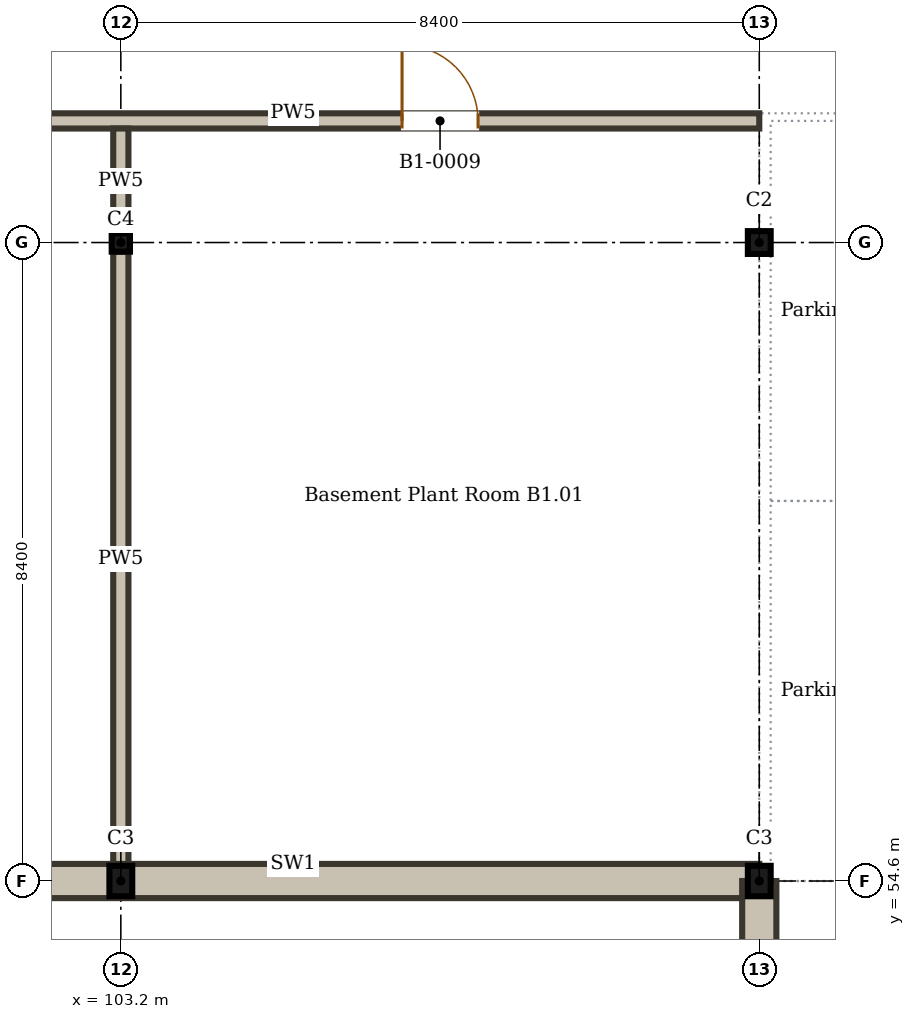
"""IFC4 building model, lengths in metres.
Left out: names, types, materials, properties, quantities, classifications, styles, units other than length and angle.
Written with IfcOpenShell. Run it as: python <this file> out.ifc"""

import sys

from ifc_helpers import new_model, si_unit, direction, frame, frame_2d, origin, origin_2d, place, context, subcontext, project, spatial, rectangle, i_section, extrude, element, fill, save


model = new_model("IFC4")
c1 = context("Model", 3, precision=1e-05, world=origin(), true_north=direction((0.0, 1.0)))
c2 = subcontext(c1, "Body", "Model", "MODEL_VIEW")
j1 = project(units=[si_unit("LENGTHUNIT", "METRE"), si_unit("PLANEANGLEUNIT", "RADIAN")], contexts=[c1])
p1 = place(None, origin())
s1 = spatial("IfcSite", under=j1, at=p1, CompositionType="ELEMENT")
p2 = place(p1, origin())
s2 = spatial("IfcBuilding", under=s1, at=p2, CompositionType="ELEMENT")
p3 = place(p2, frame((0.0, 0.0, -4.5)))
s3 = spatial("IfcBuildingStorey", under=s2, at=p3, CompositionType="ELEMENT", Elevation=-4.5)
for number, where, z_axis, x_axis in (
    (1, (103.2, 54.6, 0.0), (0.0, 0.0, 1.0), (1.0, 0.0, 0.0)),
    (2, (111.6, 54.6, 0.0), (0.0, 0.0, 1.0), (1.0, 0.0, 0.0)),
):
    element("IfcColumn", number, at=place(p3, frame(where, z_axis=z_axis, x_axis=x_axis)), inside=s3, PredefinedType="COLUMN", context=c2, shape_type="SweptSolid", body=[
        extrude(i_section(OverallWidth=0.3, OverallDepth=0.4, WebThickness=0.013, FlangeThickness=0.024, FilletRadius=0.027, at=origin_2d()), origin(), (0.0, 0.0, 1.0), 4.5),
    ])
p4 = place(p3, frame((103.2, 63.0, 0.0), z_axis=(0.0, 0.0, 1.0), x_axis=(1.0, 0.0, 0.0)))
e3 = element("IfcColumn", 3, at=p4, inside=s3, PredefinedType="COLUMN", context=c2, shape_type="SweptSolid", body=[
    extrude(i_section(OverallWidth=0.24, OverallDepth=0.24, WebThickness=0.01, FlangeThickness=0.017, FilletRadius=0.021, at=origin_2d()), origin(), (0.0, 0.0, 1.0), 4.5),
])
p5 = place(p3, frame((111.6, 63.0, 0.0), z_axis=(0.0, 0.0, 1.0), x_axis=(1.0, 0.0, 0.0)))
e4 = element("IfcColumn", 4, at=p5, inside=s3, PredefinedType="COLUMN", context=c2, shape_type="SweptSolid", body=[
    extrude(i_section(OverallWidth=0.3, OverallDepth=0.3, WebThickness=0.011, FlangeThickness=0.019, FilletRadius=0.027, at=origin_2d()), origin(), (0.0, 0.0, 1.0), 4.5),
])
p6 = place(p3, frame((44.4, 54.6, 0.0), z_axis=(0.0, 0.0, 1.0), x_axis=(1.0, 0.0, 0.0)))
e5 = element("IfcWall", 5, at=p6, inside=s3, PredefinedType="SOLIDWALL", context=c2, shape_type="SweptSolid", body=[
    extrude(rectangle(XDim=67.2, YDim=0.45, at=frame_2d((33.6, 0.0))), origin(), (0.0, 0.0, 1.0), 4.35),
])
p7 = place(p3, frame((111.6, 54.6, 0.0), z_axis=(0.0, 0.0, 1.0), x_axis=(0.0, -1.0, 0.0)))
e6 = element("IfcWall", 6, at=p7, inside=s3, PredefinedType="SOLIDWALL", context=c2, shape_type="SweptSolid", body=[
    extrude(rectangle(XDim=25.2, YDim=0.45, at=frame_2d((12.6, 0.0))), origin(), (0.0, 0.0, 1.0), 4.35),
])
p8 = place(p3, frame((44.4, 64.6, 0.0), z_axis=(0.0, 0.0, 1.0), x_axis=(1.0, 0.0, 0.0)))
e7 = element("IfcWall", 7, at=p8, inside=s3, PredefinedType="SOLIDWALL", context=c2, shape_type="SweptSolid", body=[
    extrude(rectangle(XDim=67.2, YDim=0.2, at=frame_2d((33.6, 0.0))), origin(), (0.0, 0.0, 1.0), 3.8),
])
p9 = place(p8, frame((3.2, 0.0, 0.0)))
e8 = element("IfcOpeningElement", 8, at=p9, cuts=e7, PredefinedType="OPENING", context=c2, shape_type="SweptSolid", body=[
    extrude(rectangle(XDim=1.0, YDim=2.1, at=frame_2d((0.5, 1.05))), frame((0.0, 0.11, 0.0), z_axis=(0.0, -1.0, 0.0), x_axis=(1.0, 0.0, 0.0)), (0.0, 0.0, 1.0), 0.22),
])
p10 = place(p8, frame((21.0, 0.0, 0.0)))
e9 = element("IfcOpeningElement", 9, at=p10, cuts=e7, PredefinedType="OPENING", context=c2, shape_type="SweptSolid", body=[
    extrude(rectangle(XDim=1.0, YDim=2.1, at=frame_2d((0.5, 1.05))), frame((0.0, 0.11, 0.0), z_axis=(0.0, -1.0, 0.0), x_axis=(1.0, 0.0, 0.0)), (0.0, 0.0, 1.0), 0.22),
])
p11 = place(p8, frame((28.9, 0.0, 0.0)))
e10 = element("IfcOpeningElement", 10, at=p11, cuts=e7, PredefinedType="OPENING", context=c2, shape_type="SweptSolid", body=[
    extrude(rectangle(XDim=1.0, YDim=2.1, at=frame_2d((0.5, 1.05))), frame((0.0, 0.11, 0.0), z_axis=(0.0, -1.0, 0.0), x_axis=(1.0, 0.0, 0.0)), (0.0, 0.0, 1.0), 0.22),
])
p12 = place(p8, frame((36.8, 0.0, 0.0)))
e11 = element("IfcOpeningElement", 11, at=p12, cuts=e7, PredefinedType="OPENING", context=c2, shape_type="SweptSolid", body=[
    extrude(rectangle(XDim=1.0, YDim=2.1, at=frame_2d((0.5, 1.05))), frame((0.0, 0.11, 0.0), z_axis=(0.0, -1.0, 0.0), x_axis=(1.0, 0.0, 0.0)), (0.0, 0.0, 1.0), 0.22),
])
p13 = place(p8, frame((54.5, 0.0, 0.0)))
e12 = element("IfcOpeningElement", 12, at=p13, cuts=e7, PredefinedType="OPENING", context=c2, shape_type="SweptSolid", body=[
    extrude(rectangle(XDim=1.0, YDim=2.1, at=frame_2d((0.5, 1.05))), frame((0.0, 0.11, 0.0), z_axis=(0.0, -1.0, 0.0), x_axis=(1.0, 0.0, 0.0)), (0.0, 0.0, 1.0), 0.22),
])
p14 = place(p8, frame((62.5, 0.0, 0.0)))
e13 = element("IfcOpeningElement", 13, at=p14, cuts=e7, PredefinedType="OPENING", context=c2, shape_type="SweptSolid", body=[
    extrude(rectangle(XDim=1.0, YDim=2.1, at=frame_2d((0.5, 1.05))), frame((0.0, 0.11, 0.0), z_axis=(0.0, -1.0, 0.0), x_axis=(1.0, 0.0, 0.0)), (0.0, 0.0, 1.0), 0.22),
])
p15 = place(p3, frame((103.2, 54.8, 0.0), z_axis=(0.0, 0.0, 1.0), x_axis=(0.0, 1.0, 0.0)))
e14 = element("IfcWall", 14, at=p15, inside=s3, PredefinedType="SOLIDWALL", context=c2, shape_type="SweptSolid", body=[
    extrude(rectangle(XDim=8.08, YDim=0.2, at=frame_2d((4.04, 0.0))), origin(), (0.0, 0.0, 1.0), 3.8),
])
p16 = place(p3, frame((103.2, 63.12, 0.0), z_axis=(0.0, 0.0, 1.0), x_axis=(0.0, 1.0, 0.0)))
e15 = element("IfcWall", 15, at=p16, inside=s3, PredefinedType="SOLIDWALL", context=c2, shape_type="SweptSolid", body=[
    extrude(rectangle(XDim=1.38, YDim=0.2, at=frame_2d((0.69, 0.0))), origin(), (0.0, 0.0, 1.0), 3.8),
])
p17 = place(p14, origin())
e16 = element("IfcDoor", 16, at=p17, inside=s3, OperationType="SINGLE_SWING_LEFT", PredefinedType="DOOR", context=c2, shape_type="SweptSolid", body=[
    extrude(rectangle(XDim=1.0, YDim=2.1, at=frame_2d((0.5, 1.05))), frame((0.0, 0.025, 0.0), z_axis=(0.0, -1.0, 0.0), x_axis=(1.0, 0.0, 0.0)), (0.0, 0.0, 1.0), 0.05),
])
fill(e13, e16)
save(model, sys.argv[1])
